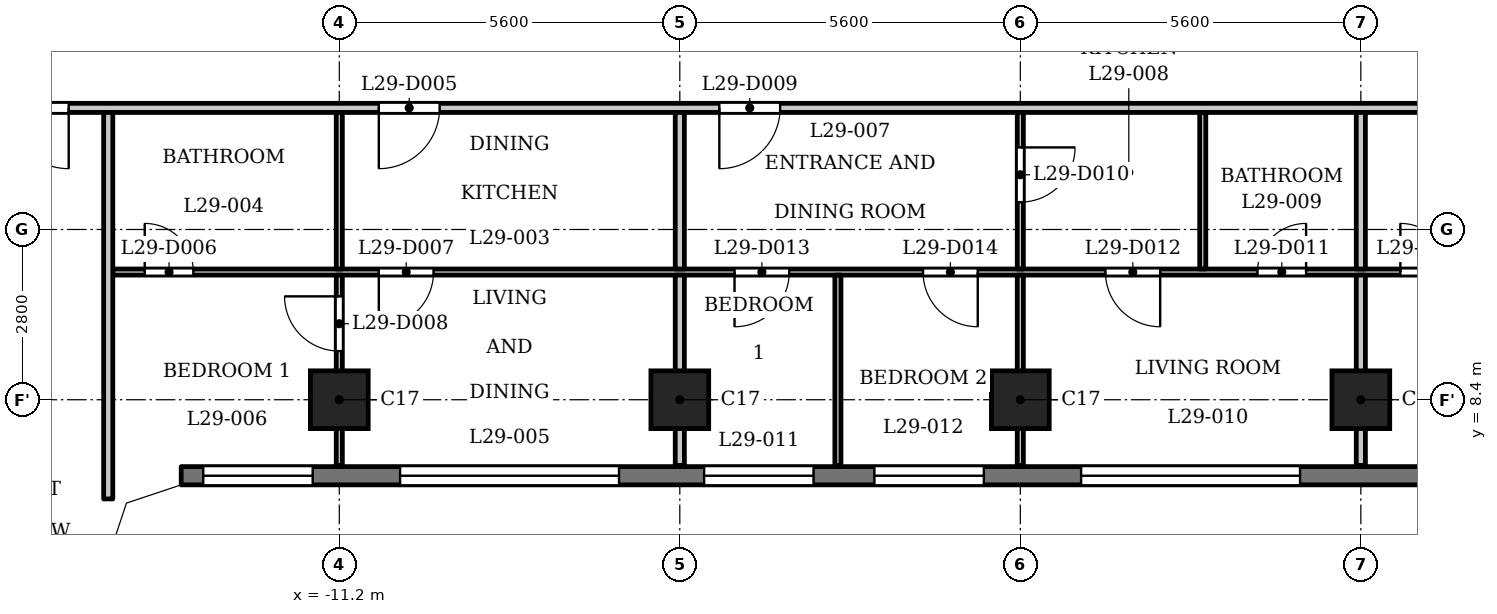
"""IFC4 building model, lengths in metres.
Left out: names, types, materials, properties, quantities, classifications, styles, units other than length and angle.
Written with IfcOpenShell. Run it as: python <this file> out.ifc"""

import sys

from ifc_helpers import new_model, si_unit, direction, frame, frame_2d, origin, origin_2d, place, context, subcontext, project, spatial, polyline, rectangle, outline, extrude, element, fill, save


model = new_model("IFC4")
c1 = context("Model", 3, precision=1e-05, world=origin(), true_north=direction((0.0, 1.0)))
c2 = subcontext(c1, "Body", "Model", "MODEL_VIEW")
j1 = project(units=[si_unit("LENGTHUNIT", "METRE"), si_unit("PLANEANGLEUNIT", "RADIAN")], contexts=[c1])
p1 = place(None, origin())
s1 = spatial("IfcSite", under=j1, at=p1, CompositionType="ELEMENT")
p2 = place(p1, origin())
s2 = spatial("IfcBuilding", under=s1, at=p2, CompositionType="ELEMENT")
p3 = place(p2, frame((0.0, 0.0, 114.8)))
s3 = spatial("IfcBuildingStorey", under=s2, at=p3, CompositionType="ELEMENT", Elevation=114.8)
for number, where, z_axis, x_axis in (
    (1, (-11.2, 8.4, 0.0), (0.0, 0.0, 1.0), (1.0, 0.0, 0.0)),
    (2, (-5.6, 8.4, 0.0), (0.0, 0.0, 1.0), (1.0, 0.0, 0.0)),
    (3, (0.0, 8.4, 0.0), (0.0, 0.0, 1.0), (1.0, 0.0, 0.0)),
    (4, (5.6, 8.4, 0.0), (0.0, 0.0, 1.0), (1.0, 0.0, 0.0)),
):
    element("IfcColumn", number, at=place(p3, frame(where, z_axis=z_axis, x_axis=x_axis)), inside=s3, PredefinedType="COLUMN", context=c2, shape_type="SweptSolid", body=[
        extrude(rectangle(XDim=0.95, YDim=0.95, at=origin_2d()), origin(), (0.0, 0.0, 1.0), 3.5),
    ])
p4 = place(p3, frame((-13.8, 7.15, 0.0), z_axis=(0.0, 0.0, 1.0), x_axis=(1.0, 0.0, 0.0)))
e5 = element("IfcWall", 5, at=p4, inside=s3, PredefinedType="SOLIDWALL", context=c2, shape_type="SweptSolid", body=[
    extrude(rectangle(XDim=27.6, YDim=0.3, at=frame_2d((13.8, 0.0))), origin(), (0.0, 0.0, 1.0), 3.2),
])
p5 = place(p4, frame((0.363, 0.0, 0.9)))
e6 = element("IfcOpeningElement", 6, at=p5, cuts=e5, PredefinedType="OPENING", context=c2, shape_type="SweptSolid", body=[
    extrude(rectangle(XDim=1.8, YDim=1.25, at=frame_2d((0.9, 0.625))), frame((0.0, 0.16, 0.0), z_axis=(0.0, -1.0, 0.0), x_axis=(1.0, 0.0, 0.0)), (0.0, 0.0, 1.0), 0.32),
])
p6 = place(p4, frame((3.6, 0.0, 1.2)))
e7 = element("IfcOpeningElement", 7, at=p6, cuts=e5, PredefinedType="OPENING", context=c2, shape_type="SweptSolid", body=[
    extrude(rectangle(XDim=3.6, YDim=0.95, at=frame_2d((1.8, 0.475))), frame((0.0, 0.16, 0.0), z_axis=(0.0, -1.0, 0.0), x_axis=(1.0, 0.0, 0.0)), (0.0, 0.0, 1.0), 0.32),
])
p7 = place(p4, frame((8.6, 0.0, 0.9)))
e8 = element("IfcOpeningElement", 8, at=p7, cuts=e5, PredefinedType="OPENING", context=c2, shape_type="SweptSolid", body=[
    extrude(rectangle(XDim=1.8, YDim=1.25, at=frame_2d((0.9, 0.625))), frame((0.0, 0.16, 0.0), z_axis=(0.0, -1.0, 0.0), x_axis=(1.0, 0.0, 0.0)), (0.0, 0.0, 1.0), 0.32),
])
p8 = place(p4, frame((11.4, 0.0, 0.9)))
e9 = element("IfcOpeningElement", 9, at=p8, cuts=e5, PredefinedType="OPENING", context=c2, shape_type="SweptSolid", body=[
    extrude(rectangle(XDim=1.8, YDim=1.25, at=frame_2d((0.9, 0.625))), frame((0.0, 0.16, 0.0), z_axis=(0.0, -1.0, 0.0), x_axis=(1.0, 0.0, 0.0)), (0.0, 0.0, 1.0), 0.32),
])
p9 = place(p4, frame((14.8, 0.0, 1.2)))
e10 = element("IfcOpeningElement", 10, at=p9, cuts=e5, PredefinedType="OPENING", context=c2, shape_type="SweptSolid", body=[
    extrude(rectangle(XDim=3.6, YDim=0.95, at=frame_2d((1.8, 0.475))), frame((0.0, 0.16, 0.0), z_axis=(0.0, -1.0, 0.0), x_axis=(1.0, 0.0, 0.0)), (0.0, 0.0, 1.0), 0.32),
])
p10 = place(p4, frame((20.4, 0.0, 1.2)))
e11 = element("IfcOpeningElement", 11, at=p10, cuts=e5, PredefinedType="OPENING", context=c2, shape_type="SweptSolid", body=[
    extrude(rectangle(XDim=3.6, YDim=0.95, at=frame_2d((1.8, 0.475))), frame((0.0, 0.16, 0.0), z_axis=(0.0, -1.0, 0.0), x_axis=(1.0, 0.0, 0.0)), (0.0, 0.0, 1.0), 0.32),
])
p11 = place(p4, frame((25.438, 0.0, 0.9)))
e12 = element("IfcOpeningElement", 12, at=p11, cuts=e5, PredefinedType="OPENING", context=c2, shape_type="SweptSolid", body=[
    extrude(rectangle(XDim=1.8, YDim=1.25, at=frame_2d((0.9, 0.625))), frame((0.0, 0.16, 0.0), z_axis=(0.0, -1.0, 0.0), x_axis=(1.0, 0.0, 0.0)), (0.0, 0.0, 1.0), 0.32),
])
p12 = place(p3, frame((-14.925, 10.5, 0.0), z_axis=(0.0, 0.0, 1.0), x_axis=(1.0, 0.0, 0.0)))
e13 = element("IfcWall", 13, at=p12, inside=s3, PredefinedType="PARTITIONING", context=c2, shape_type="SweptSolid", body=[
    extrude(rectangle(XDim=29.85, YDim=0.1, at=frame_2d((14.925, 0.0))), origin(), (0.0, 0.0, 1.0), 3.2),
])
p13 = place(p12, frame((0.525, 0.0, 0.0)))
e14 = element("IfcOpeningElement", 14, at=p13, cuts=e13, PredefinedType="OPENING", context=c2, shape_type="SweptSolid", body=[
    extrude(rectangle(XDim=0.8, YDim=2.1, at=frame_2d((0.4, 1.05))), frame((0.0, 0.06, 0.0), z_axis=(0.0, -1.0, 0.0), x_axis=(1.0, 0.0, 0.0)), (0.0, 0.0, 1.0), 0.12),
])
p14 = place(p12, frame((4.375, 0.0, 0.0)))
e15 = element("IfcOpeningElement", 15, at=p14, cuts=e13, PredefinedType="OPENING", context=c2, shape_type="SweptSolid", body=[
    extrude(rectangle(XDim=0.9, YDim=2.1, at=frame_2d((0.45, 1.05))), frame((0.0, 0.06, 0.0), z_axis=(0.0, -1.0, 0.0), x_axis=(1.0, 0.0, 0.0)), (0.0, 0.0, 1.0), 0.12),
])
p15 = place(p12, frame((18.825, 0.0, 0.0)))
e16 = element("IfcOpeningElement", 16, at=p15, cuts=e13, PredefinedType="OPENING", context=c2, shape_type="SweptSolid", body=[
    extrude(rectangle(XDim=0.8, YDim=2.1, at=frame_2d((0.4, 1.05))), frame((0.0, 0.06, 0.0), z_axis=(0.0, -1.0, 0.0), x_axis=(1.0, 0.0, 0.0)), (0.0, 0.0, 1.0), 0.12),
])
p16 = place(p12, frame((16.325, 0.0, 0.0)))
e17 = element("IfcOpeningElement", 17, at=p16, cuts=e13, PredefinedType="OPENING", context=c2, shape_type="SweptSolid", body=[
    extrude(rectangle(XDim=0.9, YDim=2.1, at=frame_2d((0.45, 1.05))), frame((0.0, 0.06, 0.0), z_axis=(0.0, -1.0, 0.0), x_axis=(1.0, 0.0, 0.0)), (0.0, 0.0, 1.0), 0.12),
])
p17 = place(p12, frame((10.225, 0.0, 0.0)))
e18 = element("IfcOpeningElement", 18, at=p17, cuts=e13, PredefinedType="OPENING", context=c2, shape_type="SweptSolid", body=[
    extrude(rectangle(XDim=0.9, YDim=2.1, at=frame_2d((0.45, 1.05))), frame((0.0, 0.06, 0.0), z_axis=(0.0, -1.0, 0.0), x_axis=(1.0, 0.0, 0.0)), (0.0, 0.0, 1.0), 0.12),
])
p18 = place(p12, frame((13.325, 0.0, 0.0)))
e19 = element("IfcOpeningElement", 19, at=p18, cuts=e13, PredefinedType="OPENING", context=c2, shape_type="SweptSolid", body=[
    extrude(rectangle(XDim=0.9, YDim=2.1, at=frame_2d((0.45, 1.05))), frame((0.0, 0.06, 0.0), z_axis=(0.0, -1.0, 0.0), x_axis=(1.0, 0.0, 0.0)), (0.0, 0.0, 1.0), 0.12),
])
p19 = place(p12, frame((21.175, 0.0, 0.0)))
e20 = element("IfcOpeningElement", 20, at=p19, cuts=e13, PredefinedType="OPENING", context=c2, shape_type="SweptSolid", body=[
    extrude(rectangle(XDim=0.8, YDim=2.1, at=frame_2d((0.4, 1.05))), frame((0.0, 0.06, 0.0), z_axis=(0.0, -1.0, 0.0), x_axis=(1.0, 0.0, 0.0)), (0.0, 0.0, 1.0), 0.12),
])
p20 = place(p12, frame((26.775, 0.0, 0.0)))
e21 = element("IfcOpeningElement", 21, at=p20, cuts=e13, PredefinedType="OPENING", context=c2, shape_type="SweptSolid", body=[
    extrude(rectangle(XDim=0.9, YDim=2.1, at=frame_2d((0.45, 1.05))), frame((0.0, 0.06, 0.0), z_axis=(0.0, -1.0, 0.0), x_axis=(1.0, 0.0, 0.0)), (0.0, 0.0, 1.0), 0.12),
])
p21 = place(p3, frame((-17.4, 13.2, 0.0), z_axis=(0.0, 0.0, 1.0), x_axis=(1.0, 0.0, 0.0)))
e22 = element("IfcWall", 22, at=p21, inside=s3, PredefinedType="PARTITIONING", context=c2, shape_type="SweptSolid", body=[
    extrude(rectangle(XDim=34.8, YDim=0.15, at=frame_2d((17.4, 0.0))), origin(), (0.0, 0.0, 1.0), 3.2),
])
p22 = place(p21, frame((0.75, 0.0, 0.0)))
e23 = element("IfcOpeningElement", 23, at=p22, cuts=e22, PredefinedType="OPENING", context=c2, shape_type="SweptSolid", body=[
    extrude(rectangle(XDim=1.0, YDim=2.1, at=frame_2d((0.5, 1.05))), frame((0.0, 0.085, 0.0), z_axis=(0.0, -1.0, 0.0), x_axis=(1.0, 0.0, 0.0)), (0.0, 0.0, 1.0), 0.17),
])
p23 = place(p21, frame((33.15, 0.0, 0.0)))
e24 = element("IfcOpeningElement", 24, at=p23, cuts=e22, PredefinedType="OPENING", context=c2, shape_type="SweptSolid", body=[
    extrude(rectangle(XDim=1.0, YDim=2.1, at=frame_2d((0.5, 1.05))), frame((0.0, 0.085, 0.0), z_axis=(0.0, -1.0, 0.0), x_axis=(1.0, 0.0, 0.0)), (0.0, 0.0, 1.0), 0.17),
])
p24 = place(p21, frame((6.85, 0.0, 0.0)))
e25 = element("IfcOpeningElement", 25, at=p24, cuts=e22, PredefinedType="OPENING", context=c2, shape_type="SweptSolid", body=[
    extrude(rectangle(XDim=1.0, YDim=2.1, at=frame_2d((0.5, 1.05))), frame((0.0, 0.085, 0.0), z_axis=(0.0, -1.0, 0.0), x_axis=(1.0, 0.0, 0.0)), (0.0, 0.0, 1.0), 0.17),
])
p25 = place(p21, frame((12.45, 0.0, 0.0)))
e26 = element("IfcOpeningElement", 26, at=p25, cuts=e22, PredefinedType="OPENING", context=c2, shape_type="SweptSolid", body=[
    extrude(rectangle(XDim=1.0, YDim=2.1, at=frame_2d((0.5, 1.05))), frame((0.0, 0.085, 0.0), z_axis=(0.0, -1.0, 0.0), x_axis=(1.0, 0.0, 0.0)), (0.0, 0.0, 1.0), 0.17),
])
p26 = place(p21, frame((29.25, 0.0, 0.0)))
e27 = element("IfcOpeningElement", 27, at=p26, cuts=e22, PredefinedType="OPENING", context=c2, shape_type="SweptSolid", body=[
    extrude(rectangle(XDim=1.0, YDim=2.1, at=frame_2d((0.5, 1.05))), frame((0.0, 0.085, 0.0), z_axis=(0.0, -1.0, 0.0), x_axis=(1.0, 0.0, 0.0)), (0.0, 0.0, 1.0), 0.17),
])
p27 = place(p3, frame((-15.0, 6.769, 0.0), z_axis=(0.0, 0.0, 1.0), x_axis=(0.0, 1.0, 0.0)))
e28 = element("IfcWall", 28, at=p27, inside=s3, PredefinedType="PARTITIONING", context=c2, shape_type="SweptSolid", body=[
    extrude(rectangle(XDim=6.356, YDim=0.15, at=frame_2d((3.178, 0.0))), origin(), (0.0, 0.0, 1.0), 3.2),
])
p28 = place(p3, frame((-11.2, 7.32, 0.0), z_axis=(0.0, 0.0, 1.0), x_axis=(0.0, 1.0, 0.0)))
e29 = element("IfcWall", 29, at=p28, inside=s3, PredefinedType="PARTITIONING", context=c2, shape_type="SweptSolid", body=[
    extrude(rectangle(XDim=3.13, YDim=0.1, at=frame_2d((1.565, 0.0))), origin(), (0.0, 0.0, 1.0), 3.2),
])
p29 = place(p28, frame((1.88, 0.0, 0.0)))
e30 = element("IfcOpeningElement", 30, at=p29, cuts=e29, PredefinedType="OPENING", context=c2, shape_type="SweptSolid", body=[
    extrude(rectangle(XDim=0.9, YDim=2.1, at=frame_2d((0.45, 1.05))), frame((0.0, 0.06, 0.0), z_axis=(0.0, -1.0, 0.0), x_axis=(1.0, 0.0, 0.0)), (0.0, 0.0, 1.0), 0.12),
])
p30 = place(p3, frame((-11.2, 10.55, 0.0), z_axis=(0.0, 0.0, 1.0), x_axis=(0.0, 1.0, 0.0)))
e31 = element("IfcWall", 31, at=p30, inside=s3, PredefinedType="PARTITIONING", context=c2, shape_type="SweptSolid", body=[
    extrude(rectangle(XDim=2.575, YDim=0.1, at=frame_2d((1.288, 0.0))), origin(), (0.0, 0.0, 1.0), 3.2),
])
p31 = place(p3, frame((-5.6, 7.32, 0.0), z_axis=(0.0, 0.0, 1.0), x_axis=(0.0, 1.0, 0.0)))
e32 = element("IfcWall", 32, at=p31, inside=s3, PredefinedType="PARTITIONING", context=c2, shape_type="SweptSolid", body=[
    extrude(rectangle(XDim=3.13, YDim=0.15, at=frame_2d((1.565, 0.0))), origin(), (0.0, 0.0, 1.0), 3.2),
])
p32 = place(p3, frame((-5.6, 10.55, 0.0), z_axis=(0.0, 0.0, 1.0), x_axis=(0.0, 1.0, 0.0)))
e33 = element("IfcWall", 33, at=p32, inside=s3, PredefinedType="PARTITIONING", context=c2, shape_type="SweptSolid", body=[
    extrude(rectangle(XDim=2.575, YDim=0.15, at=frame_2d((1.288, 0.0))), origin(), (0.0, 0.0, 1.0), 3.2),
])
for number, where, z_axis, x_axis in (
    (34, (-3.0, 7.32, 0.0), (0.0, 0.0, 1.0), (0.0, 1.0, 0.0)),
    (35, (0.0, 7.32, 0.0), (0.0, 0.0, 1.0), (0.0, 1.0, 0.0)),
):
    element("IfcWall", number, at=place(p3, frame(where, z_axis=z_axis, x_axis=x_axis)), inside=s3, PredefinedType="PARTITIONING", context=c2, shape_type="SweptSolid", body=[
        extrude(rectangle(XDim=3.13, YDim=0.1, at=frame_2d((1.565, 0.0))), origin(), (0.0, 0.0, 1.0), 3.2),
    ])
p33 = place(p3, frame((0.0, 10.55, 0.0), z_axis=(0.0, 0.0, 1.0), x_axis=(0.0, 1.0, 0.0)))
e36 = element("IfcWall", 36, at=p33, inside=s3, PredefinedType="PARTITIONING", context=c2, shape_type="SweptSolid", body=[
    extrude(rectangle(XDim=2.575, YDim=0.1, at=frame_2d((1.288, 0.0))), origin(), (0.0, 0.0, 1.0), 3.2),
])
p34 = place(p33, frame((1.1, 0.0, 0.0)))
e37 = element("IfcOpeningElement", 37, at=p34, cuts=e36, PredefinedType="OPENING", context=c2, shape_type="SweptSolid", body=[
    extrude(rectangle(XDim=0.9, YDim=2.1, at=frame_2d((0.45, 1.05))), frame((0.0, 0.06, 0.0), z_axis=(0.0, -1.0, 0.0), x_axis=(1.0, 0.0, 0.0)), (0.0, 0.0, 1.0), 0.12),
])
p35 = place(p3, frame((3.0, 10.55, 0.0), z_axis=(0.0, 0.0, 1.0), x_axis=(0.0, 1.0, 0.0)))
e38 = element("IfcWall", 38, at=p35, inside=s3, PredefinedType="PARTITIONING", context=c2, shape_type="SweptSolid", body=[
    extrude(rectangle(XDim=2.575, YDim=0.1, at=frame_2d((1.288, 0.0))), origin(), (0.0, 0.0, 1.0), 3.2),
])
p36 = place(p3, frame((5.6, 7.32, 0.0), z_axis=(0.0, 0.0, 1.0), x_axis=(0.0, 1.0, 0.0)))
e39 = element("IfcWall", 39, at=p36, inside=s3, PredefinedType="PARTITIONING", context=c2, shape_type="SweptSolid", body=[
    extrude(rectangle(XDim=3.13, YDim=0.15, at=frame_2d((1.565, 0.0))), origin(), (0.0, 0.0, 1.0), 3.2),
])
p37 = place(p3, frame((5.6, 10.55, 0.0), z_axis=(0.0, 0.0, 1.0), x_axis=(0.0, 1.0, 0.0)))
e40 = element("IfcWall", 40, at=p37, inside=s3, PredefinedType="PARTITIONING", context=c2, shape_type="SweptSolid", body=[
    extrude(rectangle(XDim=2.575, YDim=0.15, at=frame_2d((1.288, 0.0))), origin(), (0.0, 0.0, 1.0), 3.2),
])
p38 = place(p3, origin())
e41 = element("IfcWall", 41, at=p38, inside=s3, PredefinedType="SOLIDWALL", context=c2, shape_type="SweptSolid", body=[
    extrude(outline(polyline([(-13.849, 7.3), (-14.937, 6.937), (-15.3, 5.849), (-15.3, 5.8), (-15.0, 5.8), (-14.7, 6.7), (-13.8, 7.0), (-13.8, 7.3), (-13.849, 7.3)])), origin(), (0.0, 0.0, 1.0), 3.2),
])
p39 = place(p22, origin())
e42 = element("IfcDoor", 42, at=p39, inside=s3, OperationType="SINGLE_SWING_RIGHT", PredefinedType="DOOR", context=c2, shape_type="SweptSolid", body=[
    extrude(rectangle(XDim=1.0, YDim=2.1, at=frame_2d((0.5, 1.05))), frame((0.0, 0.025, 0.0), z_axis=(0.0, -1.0, 0.0), x_axis=(1.0, 0.0, 0.0)), (0.0, 0.0, 1.0), 0.05),
])
fill(e23, e42)
p40 = place(p24, origin())
e43 = element("IfcDoor", 43, at=p40, inside=s3, OperationType="SINGLE_SWING_LEFT", PredefinedType="DOOR", context=c2, shape_type="SweptSolid", body=[
    extrude(rectangle(XDim=1.0, YDim=2.1, at=frame_2d((0.5, 1.05))), frame((0.0, 0.025, 0.0), z_axis=(0.0, -1.0, 0.0), x_axis=(1.0, 0.0, 0.0)), (0.0, 0.0, 1.0), 0.05),
])
fill(e25, e43)
p41 = place(p13, origin())
e44 = element("IfcDoor", 44, at=p41, inside=s3, OperationType="SINGLE_SWING_RIGHT", PredefinedType="DOOR", context=c2, shape_type="SweptSolid", body=[
    extrude(rectangle(XDim=0.8, YDim=2.1, at=frame_2d((0.4, 1.05))), frame((0.0, 0.025, 0.0), z_axis=(0.0, -1.0, 0.0), x_axis=(1.0, 0.0, 0.0)), (0.0, 0.0, 1.0), 0.05),
])
fill(e14, e44)
p42 = place(p14, origin())
e45 = element("IfcDoor", 45, at=p42, inside=s3, OperationType="SINGLE_SWING_LEFT", PredefinedType="DOOR", context=c2, shape_type="SweptSolid", body=[
    extrude(rectangle(XDim=0.9, YDim=2.1, at=frame_2d((0.45, 1.05))), frame((0.0, 0.025, 0.0), z_axis=(0.0, -1.0, 0.0), x_axis=(1.0, 0.0, 0.0)), (0.0, 0.0, 1.0), 0.05),
])
fill(e15, e45)
p43 = place(p29, origin())
e46 = element("IfcDoor", 46, at=p43, inside=s3, OperationType="SINGLE_SWING_LEFT", PredefinedType="DOOR", context=c2, shape_type="SweptSolid", body=[
    extrude(rectangle(XDim=0.9, YDim=2.1, at=frame_2d((0.45, 1.05))), frame((0.0, 0.025, 0.0), z_axis=(0.0, -1.0, 0.0), x_axis=(1.0, 0.0, 0.0)), (0.0, 0.0, 1.0), 0.05),
])
fill(e30, e46)
p44 = place(p25, origin())
e47 = element("IfcDoor", 47, at=p44, inside=s3, OperationType="SINGLE_SWING_LEFT", PredefinedType="DOOR", context=c2, shape_type="SweptSolid", body=[
    extrude(rectangle(XDim=1.0, YDim=2.1, at=frame_2d((0.5, 1.05))), frame((0.0, 0.025, 0.0), z_axis=(0.0, -1.0, 0.0), x_axis=(1.0, 0.0, 0.0)), (0.0, 0.0, 1.0), 0.05),
])
fill(e26, e47)
p45 = place(p34, origin())
e48 = element("IfcDoor", 48, at=p45, inside=s3, OperationType="SINGLE_SWING_RIGHT", PredefinedType="DOOR", context=c2, shape_type="SweptSolid", body=[
    extrude(rectangle(XDim=0.9, YDim=2.1, at=frame_2d((0.45, 1.05))), frame((0.0, 0.025, 0.0), z_axis=(0.0, -1.0, 0.0), x_axis=(1.0, 0.0, 0.0)), (0.0, 0.0, 1.0), 0.05),
])
fill(e37, e48)
p46 = place(p15, origin())
e49 = element("IfcDoor", 49, at=p46, inside=s3, OperationType="SINGLE_SWING_LEFT", PredefinedType="DOOR", context=c2, shape_type="SweptSolid", body=[
    extrude(rectangle(XDim=0.8, YDim=2.1, at=frame_2d((0.4, 1.05))), frame((0.0, 0.025, 0.0), z_axis=(0.0, -1.0, 0.0), x_axis=(1.0, 0.0, 0.0)), (0.0, 0.0, 1.0), 0.05),
])
fill(e16, e49)
p47 = place(p16, origin())
e50 = element("IfcDoor", 50, at=p47, inside=s3, OperationType="SINGLE_SWING_RIGHT", PredefinedType="DOOR", context=c2, shape_type="SweptSolid", body=[
    extrude(rectangle(XDim=0.9, YDim=2.1, at=frame_2d((0.45, 1.05))), frame((0.0, 0.025, 0.0), z_axis=(0.0, -1.0, 0.0), x_axis=(1.0, 0.0, 0.0)), (0.0, 0.0, 1.0), 0.05),
])
fill(e17, e50)
p48 = place(p17, origin())
e51 = element("IfcDoor", 51, at=p48, inside=s3, OperationType="SINGLE_SWING_LEFT", PredefinedType="DOOR", context=c2, shape_type="SweptSolid", body=[
    extrude(rectangle(XDim=0.9, YDim=2.1, at=frame_2d((0.45, 1.05))), frame((0.0, 0.025, 0.0), z_axis=(0.0, -1.0, 0.0), x_axis=(1.0, 0.0, 0.0)), (0.0, 0.0, 1.0), 0.05),
])
fill(e18, e51)
p49 = place(p18, origin())
e52 = element("IfcDoor", 52, at=p49, inside=s3, OperationType="SINGLE_SWING_RIGHT", PredefinedType="DOOR", context=c2, shape_type="SweptSolid", body=[
    extrude(rectangle(XDim=0.9, YDim=2.1, at=frame_2d((0.45, 1.05))), frame((0.0, 0.025, 0.0), z_axis=(0.0, -1.0, 0.0), x_axis=(1.0, 0.0, 0.0)), (0.0, 0.0, 1.0), 0.05),
])
fill(e19, e52)
p50 = place(p19, origin())
e53 = element("IfcDoor", 53, at=p50, inside=s3, OperationType="SINGLE_SWING_RIGHT", PredefinedType="DOOR", context=c2, shape_type="SweptSolid", body=[
    extrude(rectangle(XDim=0.8, YDim=2.1, at=frame_2d((0.4, 1.05))), frame((0.0, 0.025, 0.0), z_axis=(0.0, -1.0, 0.0), x_axis=(1.0, 0.0, 0.0)), (0.0, 0.0, 1.0), 0.05),
])
fill(e20, e53)
p51 = place(p5, origin())
e54 = element("IfcWindow", 54, at=p51, inside=s3, PartitioningType="SINGLE_PANEL", PredefinedType="WINDOW", context=c2, shape_type="SweptSolid", body=[
    extrude(rectangle(XDim=1.8, YDim=1.25, at=frame_2d((0.9, 0.625))), frame((0.0, 0.03, 0.0), z_axis=(0.0, -1.0, 0.0), x_axis=(1.0, 0.0, 0.0)), (0.0, 0.0, 1.0), 0.06),
])
fill(e6, e54)
p52 = place(p6, origin())
e55 = element("IfcWindow", 55, at=p52, inside=s3, PartitioningType="SINGLE_PANEL", PredefinedType="WINDOW", context=c2, shape_type="SweptSolid", body=[
    extrude(rectangle(XDim=3.6, YDim=0.95, at=frame_2d((1.8, 0.475))), frame((0.0, 0.03, 0.0), z_axis=(0.0, -1.0, 0.0), x_axis=(1.0, 0.0, 0.0)), (0.0, 0.0, 1.0), 0.06),
])
fill(e7, e55)
p53 = place(p7, origin())
e56 = element("IfcWindow", 56, at=p53, inside=s3, PartitioningType="SINGLE_PANEL", PredefinedType="WINDOW", context=c2, shape_type="SweptSolid", body=[
    extrude(rectangle(XDim=1.8, YDim=1.25, at=frame_2d((0.9, 0.625))), frame((0.0, 0.03, 0.0), z_axis=(0.0, -1.0, 0.0), x_axis=(1.0, 0.0, 0.0)), (0.0, 0.0, 1.0), 0.06),
])
fill(e8, e56)
p54 = place(p8, origin())
e57 = element("IfcWindow", 57, at=p54, inside=s3, PartitioningType="SINGLE_PANEL", PredefinedType="WINDOW", context=c2, shape_type="SweptSolid", body=[
    extrude(rectangle(XDim=1.8, YDim=1.25, at=frame_2d((0.9, 0.625))), frame((0.0, 0.03, 0.0), z_axis=(0.0, -1.0, 0.0), x_axis=(1.0, 0.0, 0.0)), (0.0, 0.0, 1.0), 0.06),
])
fill(e9, e57)
p55 = place(p9, origin())
e58 = element("IfcWindow", 58, at=p55, inside=s3, PartitioningType="SINGLE_PANEL", PredefinedType="WINDOW", context=c2, shape_type="SweptSolid", body=[
    extrude(rectangle(XDim=3.6, YDim=0.95, at=frame_2d((1.8, 0.475))), frame((0.0, 0.03, 0.0), z_axis=(0.0, -1.0, 0.0), x_axis=(1.0, 0.0, 0.0)), (0.0, 0.0, 1.0), 0.06),
])
fill(e10, e58)
save(model, sys.argv[1])
